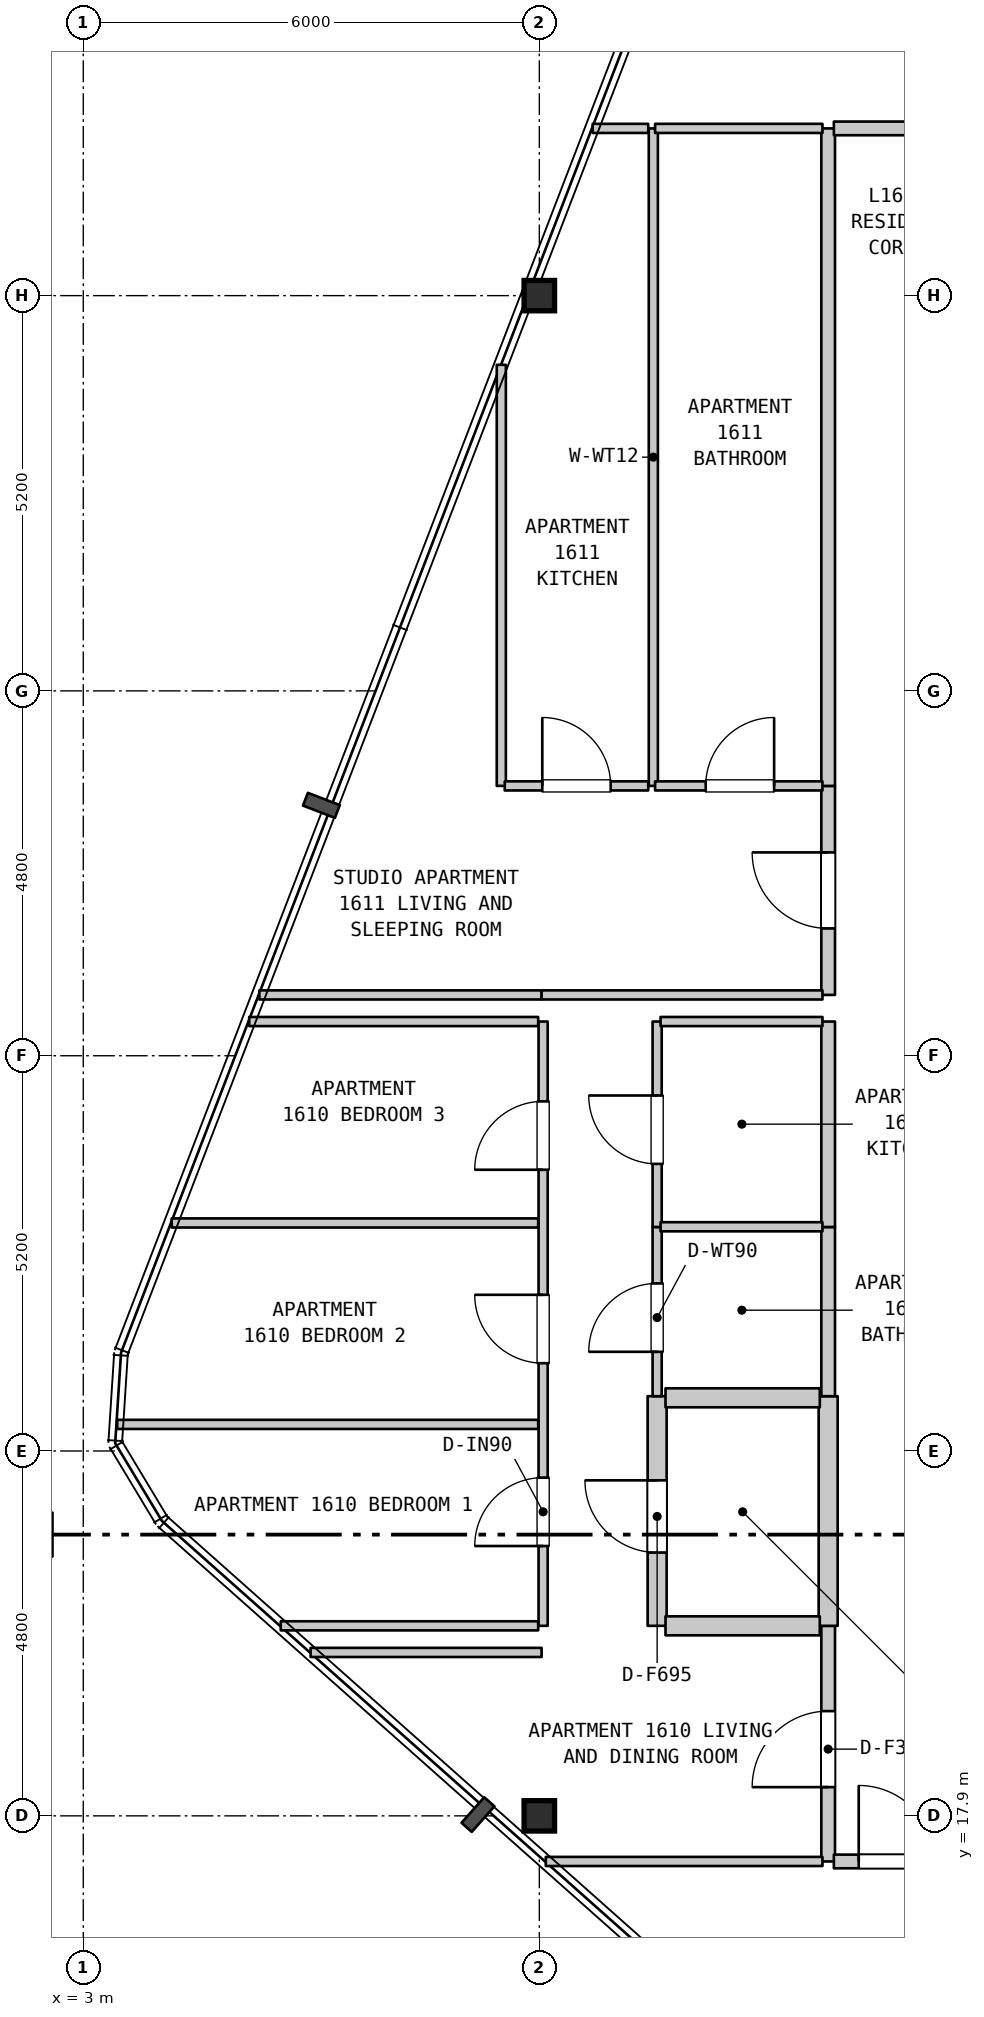
"""IFC4 building model, lengths in metres.
Left out: names, types, materials, properties, quantities, classifications, styles, units other than length and angle.
Written with IfcOpenShell. Run it as: python <this file> out.ifc"""

import sys

from ifc_helpers import new_model, si_unit, direction, frame, frame_2d, origin, origin_2d, place, context, subcontext, project, spatial, rectangle, i_section, extrude, element, fill, save


model = new_model("IFC4")
c1 = context("Model", 3, precision=1e-05, world=origin(), true_north=direction((0.0, 1.0)))
c2 = subcontext(c1, "Body", "Model", "MODEL_VIEW")
j1 = project(units=[si_unit("LENGTHUNIT", "METRE"), si_unit("PLANEANGLEUNIT", "RADIAN")], contexts=[c1])
p1 = place(None, origin())
s1 = spatial("IfcSite", under=j1, at=p1, CompositionType="ELEMENT")
p2 = place(p1, origin())
s2 = spatial("IfcBuilding", under=s1, at=p2, CompositionType="ELEMENT")
p3 = place(p2, frame((0.0, 0.0, 70.1)))
s3 = spatial("IfcBuildingStorey", under=s2, at=p3, CompositionType="ELEMENT", Elevation=70.1)
for number, where, z_axis, x_axis in (
    (1, (9.0, 17.9, 0.0), (0.0, 0.0, 1.0), (1.0, 0.0, 0.0)),
    (2, (9.0, 37.9, 0.0), (0.0, 0.0, 1.0), (1.0, 0.0, 0.0)),
):
    element("IfcColumn", number, at=place(p3, frame(where, z_axis=z_axis, x_axis=x_axis)), inside=s3, PredefinedType="COLUMN", context=c2, shape_type="SweptSolid", body=[
        extrude(i_section(OverallWidth=0.401, OverallDepth=0.399, WebThickness=0.025, FlangeThickness=0.04, FilletRadius=0.015, at=origin_2d()), origin(), (0.0, 0.0, 1.0), 3.7),
    ])
p4 = place(p3, frame((8.5, 31.45, 0.0), z_axis=(0.0, 0.0, 1.0), x_axis=(0.0, 1.0, 0.0)))
e3 = element("IfcWall", 3, at=p4, inside=s3, PredefinedType="PARTITIONING", context=c2, shape_type="SweptSolid", body=[
    extrude(rectangle(XDim=5.54, YDim=0.12, at=frame_2d((2.77, 0.0))), origin(), (0.0, 0.0, 1.0), 3.385),
])
p5 = place(p3, frame((9.05, 20.4, 0.0), z_axis=(0.0, 0.0, 1.0), x_axis=(0.0, 1.0, 0.0)))
e4 = element("IfcWall", 4, at=p5, inside=s3, PredefinedType="PARTITIONING", context=c2, shape_type="SweptSolid", body=[
    extrude(rectangle(XDim=7.95, YDim=0.12, at=frame_2d((3.975, 0.0))), origin(), (0.0, 0.0, 1.0), 2.785),
])
p6 = place(p5, frame((1.05, 0.0, 0.0)))
e5 = element("IfcOpeningElement", 5, at=p6, cuts=e4, PredefinedType="OPENING", context=c2, shape_type="SweptSolid", body=[
    extrude(rectangle(XDim=0.9, YDim=2.15, at=frame_2d((0.45, 1.075))), frame((0.0, 0.07, 0.0), z_axis=(0.0, -1.0, 0.0), x_axis=(1.0, 0.0, 0.0)), (0.0, 0.0, 1.0), 0.14),
])
p7 = place(p5, frame((3.455, 0.0, 0.0)))
e6 = element("IfcOpeningElement", 6, at=p7, cuts=e4, PredefinedType="OPENING", context=c2, shape_type="SweptSolid", body=[
    extrude(rectangle(XDim=0.9, YDim=2.15, at=frame_2d((0.45, 1.075))), frame((0.0, 0.07, 0.0), z_axis=(0.0, -1.0, 0.0), x_axis=(1.0, 0.0, 0.0)), (0.0, 0.0, 1.0), 0.14),
])
p8 = place(p5, frame((6.0, 0.0, 0.0)))
e7 = element("IfcOpeningElement", 7, at=p8, cuts=e4, PredefinedType="OPENING", context=c2, shape_type="SweptSolid", body=[
    extrude(rectangle(XDim=0.9, YDim=2.15, at=frame_2d((0.45, 1.075))), frame((0.0, 0.07, 0.0), z_axis=(0.0, -1.0, 0.0), x_axis=(1.0, 0.0, 0.0)), (0.0, 0.0, 1.0), 0.14),
])
p9 = place(p3, frame((10.5, 31.45, 0.0), z_axis=(0.0, 0.0, 1.0), x_axis=(0.0, 1.0, 0.0)))
e8 = element("IfcWall", 8, at=p9, inside=s3, PredefinedType="PARTITIONING", context=c2, shape_type="SweptSolid", body=[
    extrude(rectangle(XDim=8.65, YDim=0.12, at=frame_2d((4.325, 0.0))), origin(), (0.0, 0.0, 1.0), 3.385),
])
p10 = place(p3, frame((10.55, 20.4, 0.0), z_axis=(0.0, 0.0, 1.0), x_axis=(0.0, 1.0, 0.0)))
e9 = element("IfcWall", 9, at=p10, inside=s3, PredefinedType="STANDARD", context=c2, shape_type="SweptSolid", body=[
    extrude(rectangle(XDim=3.021, YDim=0.25, at=frame_2d((1.51, 0.0))), origin(), (0.0, 0.0, 1.0), 3.385),
])
p11 = place(p10, frame((0.964, 0.0, 0.0)))
e10 = element("IfcOpeningElement", 10, at=p11, cuts=e9, PredefinedType="OPENING", context=c2, shape_type="SweptSolid", body=[
    extrude(rectangle(XDim=0.95, YDim=2.15, at=frame_2d((0.475, 1.075))), frame((0.0, 0.135, 0.0), z_axis=(0.0, -1.0, 0.0), x_axis=(1.0, 0.0, 0.0)), (0.0, 0.0, 1.0), 0.27),
])
p12 = place(p3, frame((10.55, 23.421, 0.0), z_axis=(0.0, 0.0, 1.0), x_axis=(0.0, 1.0, 0.0)))
e11 = element("IfcWall", 11, at=p12, inside=s3, PredefinedType="PARTITIONING", context=c2, shape_type="SweptSolid", body=[
    extrude(rectangle(XDim=2.226, YDim=0.12, at=frame_2d((1.113, 0.0))), origin(), (0.0, 0.0, 1.0), 3.385),
])
p13 = place(p12, frame((0.584, 0.0, 0.0)))
e12 = element("IfcOpeningElement", 12, at=p13, cuts=e11, PredefinedType="OPENING", context=c2, shape_type="SweptSolid", body=[
    extrude(rectangle(XDim=0.9, YDim=2.1, at=frame_2d((0.45, 1.05))), frame((0.0, 0.07, 0.0), z_axis=(0.0, -1.0, 0.0), x_axis=(1.0, 0.0, 0.0)), (0.0, 0.0, 1.0), 0.14),
])
p14 = place(p3, frame((10.55, 25.647, 0.0), z_axis=(0.0, 0.0, 1.0), x_axis=(0.0, 1.0, 0.0)))
e13 = element("IfcWall", 13, at=p14, inside=s3, PredefinedType="PARTITIONING", context=c2, shape_type="SweptSolid", body=[
    extrude(rectangle(XDim=2.703, YDim=0.12, at=frame_2d((1.352, 0.0))), origin(), (0.0, 0.0, 1.0), 3.385),
])
p15 = place(p14, frame((0.83, 0.0, 0.0)))
e14 = element("IfcOpeningElement", 14, at=p15, cuts=e13, PredefinedType="OPENING", context=c2, shape_type="SweptSolid", body=[
    extrude(rectangle(XDim=0.9, YDim=2.15, at=frame_2d((0.45, 1.075))), frame((0.0, 0.07, 0.0), z_axis=(0.0, -1.0, 0.0), x_axis=(1.0, 0.0, 0.0)), (0.0, 0.0, 1.0), 0.14),
])
p16 = place(p3, frame((12.8, 17.3, 0.0), z_axis=(0.0, 0.0, 1.0), x_axis=(0.0, 1.0, 0.0)))
e15 = element("IfcWall", 15, at=p16, inside=s3, PredefinedType="STANDARD", context=c2, shape_type="SweptSolid", body=[
    extrude(rectangle(XDim=3.1, YDim=0.18, at=frame_2d((1.55, 0.0))), origin(), (0.0, 0.0, 1.0), 3.385),
])
p17 = place(p16, frame((0.978, 0.0, 0.0)))
e16 = element("IfcOpeningElement", 16, at=p17, cuts=e15, PredefinedType="OPENING", context=c2, shape_type="SweptSolid", body=[
    extrude(rectangle(XDim=1.0, YDim=2.15, at=frame_2d((0.5, 1.075))), frame((0.0, 0.1, 0.0), z_axis=(0.0, -1.0, 0.0), x_axis=(1.0, 0.0, 0.0)), (0.0, 0.0, 1.0), 0.2),
])
p18 = place(p3, frame((12.8, 20.4, 0.0), z_axis=(0.0, 0.0, 1.0), x_axis=(0.0, 1.0, 0.0)))
e17 = element("IfcWall", 17, at=p18, inside=s3, PredefinedType="STANDARD", context=c2, shape_type="SweptSolid", body=[
    extrude(rectangle(XDim=3.021, YDim=0.25, at=frame_2d((1.51, 0.0))), origin(), (0.0, 0.0, 1.0), 3.385),
])
p19 = place(p3, frame((12.8, 23.421, 0.0), z_axis=(0.0, 0.0, 1.0), x_axis=(0.0, 1.0, 0.0)))
e18 = element("IfcWall", 18, at=p19, inside=s3, PredefinedType="STANDARD", context=c2, shape_type="SweptSolid", body=[
    extrude(rectangle(XDim=2.226, YDim=0.18, at=frame_2d((1.113, 0.0))), origin(), (0.0, 0.0, 1.0), 3.385),
])
p20 = place(p3, frame((12.8, 25.647, 0.0), z_axis=(0.0, 0.0, 1.0), x_axis=(0.0, 1.0, 0.0)))
e19 = element("IfcWall", 19, at=p20, inside=s3, PredefinedType="STANDARD", context=c2, shape_type="SweptSolid", body=[
    extrude(rectangle(XDim=2.703, YDim=0.18, at=frame_2d((1.352, 0.0))), origin(), (0.0, 0.0, 1.0), 3.385),
])
p21 = place(p3, frame((12.8, 28.7, 0.0), z_axis=(0.0, 0.0, 1.0), x_axis=(0.0, 1.0, 0.0)))
e20 = element("IfcWall", 20, at=p21, inside=s3, PredefinedType="STANDARD", context=c2, shape_type="SweptSolid", body=[
    extrude(rectangle(XDim=2.75, YDim=0.18, at=frame_2d((1.375, 0.0))), origin(), (0.0, 0.0, 1.0), 3.385),
])
p22 = place(p21, frame((0.875, 0.0, 0.0)))
e21 = element("IfcOpeningElement", 21, at=p22, cuts=e20, PredefinedType="OPENING", context=c2, shape_type="SweptSolid", body=[
    extrude(rectangle(XDim=1.0, YDim=2.15, at=frame_2d((0.5, 1.075))), frame((0.0, 0.1, 0.0), z_axis=(0.0, -1.0, 0.0), x_axis=(1.0, 0.0, 0.0)), (0.0, 0.0, 1.0), 0.2),
])
p23 = place(p3, frame((12.8, 31.45, 0.0), z_axis=(0.0, 0.0, 1.0), x_axis=(0.0, 1.0, 0.0)))
e22 = element("IfcWall", 22, at=p23, inside=s3, PredefinedType="STANDARD", context=c2, shape_type="SweptSolid", body=[
    extrude(rectangle(XDim=8.65, YDim=0.18, at=frame_2d((4.325, 0.0))), origin(), (0.0, 0.0, 1.0), 3.385),
])
p24 = place(p3, frame((9.085, 17.3, 0.0), z_axis=(0.0, 0.0, 1.0), x_axis=(1.0, 0.0, 0.0)))
e23 = element("IfcWall", 23, at=p24, inside=s3, PredefinedType="PARTITIONING", context=c2, shape_type="SweptSolid", body=[
    extrude(rectangle(XDim=3.64, YDim=0.12, at=frame_2d((1.82, 0.0))), origin(), (0.0, 0.0, 1.0), 3.385),
])
p25 = place(p3, frame((12.875, 17.3, 0.0), z_axis=(0.0, 0.0, 1.0), x_axis=(1.0, 0.0, 0.0)))
e24 = element("IfcWall", 24, at=p25, inside=s3, PredefinedType="STANDARD", context=c2, shape_type="SweptSolid", body=[
    extrude(rectangle(XDim=3.58, YDim=0.18, at=frame_2d((1.79, 0.0))), origin(), (0.0, 0.0, 1.0), 3.385),
])
p26 = place(p25, frame((0.327, 0.0, 0.0)))
e25 = element("IfcOpeningElement", 25, at=p26, cuts=e24, PredefinedType="OPENING", context=c2, shape_type="SweptSolid", body=[
    extrude(rectangle(XDim=1.0, YDim=2.15, at=frame_2d((0.5, 1.075))), frame((0.0, 0.1, 0.0), z_axis=(0.0, -1.0, 0.0), x_axis=(1.0, 0.0, 0.0)), (0.0, 0.0, 1.0), 0.2),
])
p27 = place(p3, frame((5.991, 20.05, 0.0), z_axis=(0.0, 0.0, 1.0), x_axis=(1.0, 0.0, 0.0)))
e26 = element("IfcWall", 26, at=p27, inside=s3, PredefinedType="PARTITIONING", context=c2, shape_type="SweptSolid", body=[
    extrude(rectangle(XDim=3.039, YDim=0.12, at=frame_2d((1.52, 0.0))), origin(), (0.0, 0.0, 1.0), 3.385),
])
p28 = place(p3, frame((5.598, 20.4, 0.0), z_axis=(0.0, 0.0, 1.0), x_axis=(1.0, 0.0, 0.0)))
e27 = element("IfcWall", 27, at=p28, inside=s3, PredefinedType="PARTITIONING", context=c2, shape_type="SweptSolid", body=[
    extrude(rectangle(XDim=3.387, YDim=0.12, at=frame_2d((1.694, 0.0))), origin(), (0.0, 0.0, 1.0), 3.385),
])
p29 = place(p3, frame((10.66, 20.4, 0.0), z_axis=(0.0, 0.0, 1.0), x_axis=(1.0, 0.0, 0.0)))
e28 = element("IfcWall", 28, at=p29, inside=s3, PredefinedType="STANDARD", context=c2, shape_type="SweptSolid", body=[
    extrude(rectangle(XDim=2.03, YDim=0.25, at=frame_2d((1.015, 0.0))), origin(), (0.0, 0.0, 1.0), 3.385),
])
p30 = place(p3, frame((3.446, 23.05, 0.0), z_axis=(0.0, 0.0, 1.0), x_axis=(1.0, 0.0, 0.0)))
e29 = element("IfcWall", 29, at=p30, inside=s3, PredefinedType="PARTITIONING", context=c2, shape_type="SweptSolid", body=[
    extrude(rectangle(XDim=5.539, YDim=0.12, at=frame_2d((2.77, 0.0))), origin(), (0.0, 0.0, 1.0), 3.385),
])
p31 = place(p3, frame((10.66, 23.4, 0.0), z_axis=(0.0, 0.0, 1.0), x_axis=(1.0, 0.0, 0.0)))
e30 = element("IfcWall", 30, at=p31, inside=s3, PredefinedType="STANDARD", context=c2, shape_type="SweptSolid", body=[
    extrude(rectangle(XDim=2.03, YDim=0.25, at=frame_2d((1.015, 0.0))), origin(), (0.0, 0.0, 1.0), 3.385),
])
p32 = place(p3, frame((10.595, 25.65, 0.0), z_axis=(0.0, 0.0, 1.0), x_axis=(1.0, 0.0, 0.0)))
e31 = element("IfcWall", 31, at=p32, inside=s3, PredefinedType="PARTITIONING", context=c2, shape_type="SweptSolid", body=[
    extrude(rectangle(XDim=2.13, YDim=0.12, at=frame_2d((1.065, 0.0))), origin(), (0.0, 0.0, 1.0), 3.385),
])
p33 = place(p3, frame((4.164, 25.7, 0.0), z_axis=(0.0, 0.0, 1.0), x_axis=(1.0, 0.0, 0.0)))
e32 = element("IfcWall", 32, at=p33, inside=s3, PredefinedType="PARTITIONING", context=c2, shape_type="SweptSolid", body=[
    extrude(rectangle(XDim=4.821, YDim=0.12, at=frame_2d((2.411, 0.0))), origin(), (0.0, 0.0, 1.0), 3.385),
])
p34 = place(p3, frame((5.183, 28.35, 0.0), z_axis=(0.0, 0.0, 1.0), x_axis=(1.0, 0.0, 0.0)))
e33 = element("IfcWall", 33, at=p34, inside=s3, PredefinedType="PARTITIONING", context=c2, shape_type="SweptSolid", body=[
    extrude(rectangle(XDim=3.802, YDim=0.12, at=frame_2d((1.901, 0.0))), origin(), (0.0, 0.0, 1.0), 3.385),
])
p35 = place(p3, frame((10.595, 28.35, 0.0), z_axis=(0.0, 0.0, 1.0), x_axis=(1.0, 0.0, 0.0)))
e34 = element("IfcWall", 34, at=p35, inside=s3, PredefinedType="PARTITIONING", context=c2, shape_type="SweptSolid", body=[
    extrude(rectangle(XDim=2.13, YDim=0.12, at=frame_2d((1.065, 0.0))), origin(), (0.0, 0.0, 1.0), 3.385),
])
p36 = place(p3, frame((5.317, 28.7, 0.0), z_axis=(0.0, 0.0, 1.0), x_axis=(1.0, 0.0, 0.0)))
e35 = element("IfcWall", 35, at=p36, inside=s3, PredefinedType="PARTITIONING", context=c2, shape_type="SweptSolid", body=[
    extrude(rectangle(XDim=3.713, YDim=0.12, at=frame_2d((1.856, 0.0))), origin(), (0.0, 0.0, 1.0), 3.385),
])
p37 = place(p3, frame((9.03, 28.7, 0.0), z_axis=(0.0, 0.0, 1.0), x_axis=(1.0, 0.0, 0.0)))
e36 = element("IfcWall", 36, at=p37, inside=s3, PredefinedType="PARTITIONING", context=c2, shape_type="SweptSolid", body=[
    extrude(rectangle(XDim=3.695, YDim=0.12, at=frame_2d((1.848, 0.0))), origin(), (0.0, 0.0, 1.0), 3.385),
])
p38 = place(p3, frame((8.545, 31.45, 0.0), z_axis=(0.0, 0.0, 1.0), x_axis=(1.0, 0.0, 0.0)))
e37 = element("IfcWall", 37, at=p38, inside=s3, PredefinedType="PARTITIONING", context=c2, shape_type="SweptSolid", body=[
    extrude(rectangle(XDim=1.888, YDim=0.12, at=frame_2d((0.944, 0.0))), origin(), (0.0, 0.0, 1.0), 3.385),
])
p39 = place(p38, frame((0.494, 0.0, 0.0)))
e38 = element("IfcOpeningElement", 38, at=p39, cuts=e37, PredefinedType="OPENING", context=c2, shape_type="SweptSolid", body=[
    extrude(rectangle(XDim=0.9, YDim=2.15, at=frame_2d((0.45, 1.075))), frame((0.0, 0.07, 0.0), z_axis=(0.0, -1.0, 0.0), x_axis=(1.0, 0.0, 0.0)), (0.0, 0.0, 1.0), 0.14),
])
p40 = place(p3, frame((10.523, 31.45, 0.0), z_axis=(0.0, 0.0, 1.0), x_axis=(1.0, 0.0, 0.0)))
e39 = element("IfcWall", 39, at=p40, inside=s3, PredefinedType="PARTITIONING", context=c2, shape_type="SweptSolid", body=[
    extrude(rectangle(XDim=2.202, YDim=0.12, at=frame_2d((1.101, 0.0))), origin(), (0.0, 0.0, 1.0), 3.385),
])
p41 = place(p40, frame((0.666, 0.0, 0.0)))
e40 = element("IfcOpeningElement", 40, at=p41, cuts=e39, PredefinedType="OPENING", context=c2, shape_type="SweptSolid", body=[
    extrude(rectangle(XDim=0.9, YDim=2.1, at=frame_2d((0.45, 1.05))), frame((0.0, 0.07, 0.0), z_axis=(0.0, -1.0, 0.0), x_axis=(1.0, 0.0, 0.0)), (0.0, 0.0, 1.0), 0.14),
])
p42 = place(p3, frame((9.702, 40.1, 0.0), z_axis=(0.0, 0.0, 1.0), x_axis=(1.0, 0.0, 0.0)))
e41 = element("IfcWall", 41, at=p42, inside=s3, PredefinedType="PARTITIONING", context=c2, shape_type="SweptSolid", body=[
    extrude(rectangle(XDim=0.731, YDim=0.12, at=frame_2d((0.366, 0.0))), origin(), (0.0, 0.0, 1.0), 3.385),
])
p43 = place(p3, frame((10.523, 40.1, 0.0), z_axis=(0.0, 0.0, 1.0), x_axis=(1.0, 0.0, 0.0)))
e42 = element("IfcWall", 42, at=p43, inside=s3, PredefinedType="PARTITIONING", context=c2, shape_type="SweptSolid", body=[
    extrude(rectangle(XDim=2.202, YDim=0.12, at=frame_2d((1.101, 0.0))), origin(), (0.0, 0.0, 1.0), 3.385),
])
p44 = place(p3, frame((12.875, 40.1, 0.0), z_axis=(0.0, 0.0, 1.0), x_axis=(1.0, 0.0, 0.0)))
e43 = element("IfcWall", 43, at=p44, inside=s3, PredefinedType="STANDARD", context=c2, shape_type="SweptSolid", body=[
    extrude(rectangle(XDim=1.48, YDim=0.18, at=frame_2d((0.74, 0.0))), origin(), (0.0, 0.0, 1.0), 3.385),
])
p45 = place(p6, origin())
e44 = element("IfcDoor", 44, at=p45, inside=s3, OperationType="SINGLE_SWING_LEFT", PredefinedType="DOOR", context=c2, shape_type="SweptSolid", body=[
    extrude(rectangle(XDim=0.9, YDim=2.15, at=frame_2d((0.45, 1.075))), frame((0.0, 0.025, 0.0), z_axis=(0.0, -1.0, 0.0), x_axis=(1.0, 0.0, 0.0)), (0.0, 0.0, 1.0), 0.05),
])
fill(e5, e44)
p46 = place(p7, origin())
e45 = element("IfcDoor", 45, at=p46, inside=s3, OperationType="SINGLE_SWING_RIGHT", PredefinedType="DOOR", context=c2, shape_type="SweptSolid", body=[
    extrude(rectangle(XDim=0.9, YDim=2.15, at=frame_2d((0.45, 1.075))), frame((0.0, 0.025, 0.0), z_axis=(0.0, -1.0, 0.0), x_axis=(1.0, 0.0, 0.0)), (0.0, 0.0, 1.0), 0.05),
])
fill(e6, e45)
p47 = place(p8, origin())
e46 = element("IfcDoor", 46, at=p47, inside=s3, OperationType="SINGLE_SWING_LEFT", PredefinedType="DOOR", context=c2, shape_type="SweptSolid", body=[
    extrude(rectangle(XDim=0.9, YDim=2.15, at=frame_2d((0.45, 1.075))), frame((0.0, 0.025, 0.0), z_axis=(0.0, -1.0, 0.0), x_axis=(1.0, 0.0, 0.0)), (0.0, 0.0, 1.0), 0.05),
])
fill(e7, e46)
p48 = place(p11, origin())
e47 = element("IfcDoor", 47, at=p48, inside=s3, OperationType="SINGLE_SWING_RIGHT", PredefinedType="DOOR", context=c2, shape_type="SweptSolid", body=[
    extrude(rectangle(XDim=0.95, YDim=2.15, at=frame_2d((0.475, 1.075))), frame((0.0, 0.025, 0.0), z_axis=(0.0, -1.0, 0.0), x_axis=(1.0, 0.0, 0.0)), (0.0, 0.0, 1.0), 0.05),
])
fill(e10, e47)
p49 = place(p13, origin())
e48 = element("IfcDoor", 48, at=p49, inside=s3, OperationType="SINGLE_SWING_LEFT", PredefinedType="DOOR", context=c2, shape_type="SweptSolid", body=[
    extrude(rectangle(XDim=0.9, YDim=2.1, at=frame_2d((0.45, 1.05))), frame((0.0, 0.025, 0.0), z_axis=(0.0, -1.0, 0.0), x_axis=(1.0, 0.0, 0.0)), (0.0, 0.0, 1.0), 0.05),
])
fill(e12, e48)
p50 = place(p15, origin())
e49 = element("IfcDoor", 49, at=p50, inside=s3, OperationType="SINGLE_SWING_RIGHT", PredefinedType="DOOR", context=c2, shape_type="SweptSolid", body=[
    extrude(rectangle(XDim=0.9, YDim=2.15, at=frame_2d((0.45, 1.075))), frame((0.0, 0.025, 0.0), z_axis=(0.0, -1.0, 0.0), x_axis=(1.0, 0.0, 0.0)), (0.0, 0.0, 1.0), 0.05),
])
fill(e14, e49)
p51 = place(p17, origin())
e50 = element("IfcDoor", 50, at=p51, inside=s3, OperationType="SINGLE_SWING_LEFT", PredefinedType="DOOR", context=c2, shape_type="SweptSolid", body=[
    extrude(rectangle(XDim=1.0, YDim=2.15, at=frame_2d((0.5, 1.075))), frame((0.0, 0.025, 0.0), z_axis=(0.0, -1.0, 0.0), x_axis=(1.0, 0.0, 0.0)), (0.0, 0.0, 1.0), 0.05),
])
fill(e16, e50)
p52 = place(p22, origin())
e51 = element("IfcDoor", 51, at=p52, inside=s3, OperationType="SINGLE_SWING_RIGHT", PredefinedType="DOOR", context=c2, shape_type="SweptSolid", body=[
    extrude(rectangle(XDim=1.0, YDim=2.15, at=frame_2d((0.5, 1.075))), frame((0.0, 0.025, 0.0), z_axis=(0.0, -1.0, 0.0), x_axis=(1.0, 0.0, 0.0)), (0.0, 0.0, 1.0), 0.05),
])
fill(e21, e51)
p53 = place(p26, origin())
e52 = element("IfcDoor", 52, at=p53, inside=s3, OperationType="SINGLE_SWING_LEFT", PredefinedType="DOOR", context=c2, shape_type="SweptSolid", body=[
    extrude(rectangle(XDim=1.0, YDim=2.15, at=frame_2d((0.5, 1.075))), frame((0.0, 0.025, 0.0), z_axis=(0.0, -1.0, 0.0), x_axis=(1.0, 0.0, 0.0)), (0.0, 0.0, 1.0), 0.05),
])
fill(e25, e52)
p54 = place(p39, origin())
e53 = element("IfcDoor", 53, at=p54, inside=s3, OperationType="SINGLE_SWING_LEFT", PredefinedType="DOOR", context=c2, shape_type="SweptSolid", body=[
    extrude(rectangle(XDim=0.9, YDim=2.15, at=frame_2d((0.45, 1.075))), frame((0.0, 0.025, 0.0), z_axis=(0.0, -1.0, 0.0), x_axis=(1.0, 0.0, 0.0)), (0.0, 0.0, 1.0), 0.05),
])
fill(e38, e53)
p55 = place(p41, origin())
e54 = element("IfcDoor", 54, at=p55, inside=s3, OperationType="SINGLE_SWING_RIGHT", PredefinedType="DOOR", context=c2, shape_type="SweptSolid", body=[
    extrude(rectangle(XDim=0.9, YDim=2.1, at=frame_2d((0.45, 1.05))), frame((0.0, 0.025, 0.0), z_axis=(0.0, -1.0, 0.0), x_axis=(1.0, 0.0, 0.0)), (0.0, 0.0, 1.0), 0.05),
])
fill(e40, e54)
save(model, sys.argv[1])
